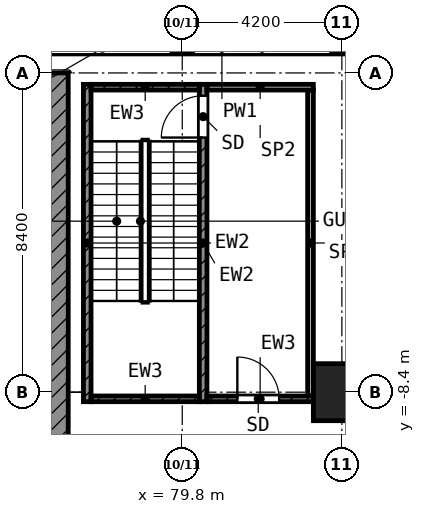
"""IFC4 building model, lengths in metres.
Left out: names, types, materials, properties, quantities, classifications, styles, units other than length and angle.
Written with IfcOpenShell. Run it as: python <this file> out.ifc"""

import sys

from ifc_helpers import new_model, si_unit, direction, frame, frame_2d, origin, origin_2d, place, context, subcontext, project, spatial, polyline, rectangle, outline, extrude, element, fill, save


model = new_model("IFC4")
c1 = context("Model", 3, precision=1e-05, world=origin(), true_north=direction((0.0, 1.0)))
c2 = subcontext(c1, "Body", "Model", "MODEL_VIEW")
j1 = project(units=[si_unit("LENGTHUNIT", "METRE"), si_unit("PLANEANGLEUNIT", "RADIAN")], contexts=[c1])
p1 = place(None, origin())
s1 = spatial("IfcSite", under=j1, at=p1, CompositionType="ELEMENT")
p2 = place(p1, origin())
s2 = spatial("IfcBuilding", under=s1, at=p2, CompositionType="ELEMENT")
p3 = place(p2, frame((0.0, 0.0, 7.0)))
s3 = spatial("IfcBuildingStorey", under=s2, at=p3, CompositionType="ELEMENT", Elevation=7.0)
p4 = place(p3, frame((84.0, -8.4, 0.0), z_axis=(0.0, 0.0, 1.0), x_axis=(1.0, 0.0, 0.0)))
e1 = element("IfcColumn", 1, at=p4, inside=s3, PredefinedType="COLUMN", context=c2, shape_type="SweptSolid", body=[
    extrude(rectangle(XDim=1.5, YDim=1.5, at=origin_2d()), origin(), (0.0, 0.0, 1.0), 5.6),
])
p5 = place(p3, frame((0.0, 0.0, -7.0), z_axis=(0.0, -1.0, 0.0), x_axis=(1.0, 0.0, 0.0)))
e2 = element("IfcWall", 2, at=p5, inside=s3, PredefinedType="SHEAR", context=c2, shape_type="SweptSolid", body=[
    extrude(outline(polyline([(74.4, 7.0), (74.4, 9.0), (74.241, 11.256), (73.952, 12.6), (76.8, 12.6), (76.8, 7.0), (74.4, 7.0)])), origin(), (0.0, 0.0, 1.0), 33.6),
])
p6 = place(p3, frame((87.138, 0.65, 0.0), z_axis=(0.0, 0.0, 1.0), x_axis=(-1.0, 0.0, 0.0)))
e3 = element("IfcWall", 3, at=p6, inside=s3, PredefinedType="SOLIDWALL", context=c2, shape_type="SweptSolid", body=[
    extrude(rectangle(XDim=12.588, YDim=0.3, at=frame_2d((6.294, 0.0))), origin(), (0.0, 0.0, 1.0), 5.25),
])
p7 = place(p6, frame((1.61, 0.0, 0.9)))
e4 = element("IfcOpeningElement", 4, at=p7, cuts=e3, PredefinedType="OPENING", context=c2, shape_type="SweptSolid", body=[
    extrude(rectangle(XDim=1.2, YDim=3.0, at=frame_2d((0.6, 1.5))), frame((0.0, 0.16, 0.0), z_axis=(0.0, -1.0, 0.0), x_axis=(1.0, 0.0, 0.0)), (0.0, 0.0, 1.0), 0.32),
])
p8 = place(p6, frame((3.438, 0.0, 0.9)))
e5 = element("IfcOpeningElement", 5, at=p8, cuts=e3, PredefinedType="OPENING", context=c2, shape_type="SweptSolid", body=[
    extrude(rectangle(XDim=3.6, YDim=3.0, at=frame_2d((1.8, 1.5))), frame((0.0, 0.16, 0.0), z_axis=(0.0, -1.0, 0.0), x_axis=(1.0, 0.0, 0.0)), (0.0, 0.0, 1.0), 0.32),
])
p9 = place(p6, frame((7.638, 0.0, 0.9)))
e6 = element("IfcOpeningElement", 6, at=p9, cuts=e3, PredefinedType="OPENING", context=c2, shape_type="SweptSolid", body=[
    extrude(rectangle(XDim=3.6, YDim=3.0, at=frame_2d((1.8, 1.5))), frame((0.0, 0.16, 0.0), z_axis=(0.0, -1.0, 0.0), x_axis=(1.0, 0.0, 0.0)), (0.0, 0.0, 1.0), 0.32),
])
p10 = place(p3, frame((77.3, -8.65, 0.0), z_axis=(0.0, 0.0, 1.0), x_axis=(0.0, 1.0, 0.0)))
e7 = element("IfcWall", 7, at=p10, inside=s3, PredefinedType="SHEAR", context=c2, shape_type="SweptSolid", body=[
    extrude(rectangle(XDim=8.35, YDim=0.2, at=frame_2d((4.175, 0.0))), origin(), (0.0, 0.0, 1.0), 5.25),
])
p11 = place(p3, frame((80.35, -8.65, 0.0), z_axis=(0.0, 0.0, 1.0), x_axis=(0.0, 1.0, 0.0)))
e8 = element("IfcWall", 8, at=p11, inside=s3, PredefinedType="SHEAR", context=c2, shape_type="SweptSolid", body=[
    extrude(rectangle(XDim=8.35, YDim=0.2, at=frame_2d((4.175, 0.0))), origin(), (0.0, 0.0, 1.0), 5.25),
])
p12 = place(p11, frame((6.95, 0.0, 0.0)))
e9 = element("IfcOpeningElement", 9, at=p12, cuts=e8, PredefinedType="OPENING", context=c2, shape_type="SweptSolid", body=[
    extrude(rectangle(XDim=1.1, YDim=2.1, at=frame_2d((0.55, 1.05))), frame((0.0, 0.11, 0.0), z_axis=(0.0, -1.0, 0.0), x_axis=(1.0, 0.0, 0.0)), (0.0, 0.0, 1.0), 0.22),
])
p13 = place(p3, frame((77.4, -0.375, 0.0), z_axis=(0.0, 0.0, 1.0), x_axis=(1.0, 0.0, 0.0)))
e10 = element("IfcWall", 10, at=p13, inside=s3, PredefinedType="SHEAR", context=c2, shape_type="SweptSolid", body=[
    extrude(rectangle(XDim=2.85, YDim=0.15, at=frame_2d((1.425, 0.0))), origin(), (0.0, 0.0, 1.0), 5.25),
])
p14 = place(p3, frame((80.45, -0.375, 0.0), z_axis=(0.0, 0.0, 1.0), x_axis=(1.0, 0.0, 0.0)))
e11 = element("IfcWall", 11, at=p14, inside=s3, PredefinedType="PARTITIONING", context=c2, shape_type="SweptSolid", body=[
    extrude(rectangle(XDim=2.8, YDim=0.15, at=frame_2d((1.4, 0.0))), origin(), (0.0, 0.0, 1.0), 5.25),
])
p15 = place(p3, frame((77.4, -8.575, 0.0), z_axis=(0.0, 0.0, 1.0), x_axis=(1.0, 0.0, 0.0)))
e12 = element("IfcWall", 12, at=p15, inside=s3, PredefinedType="SHEAR", context=c2, shape_type="SweptSolid", body=[
    extrude(rectangle(XDim=2.85, YDim=0.15, at=frame_2d((1.425, 0.0))), origin(), (0.0, 0.0, 1.0), 5.25),
])
p16 = place(p3, frame((80.45, -8.575, 0.0), z_axis=(0.0, 0.0, 1.0), x_axis=(1.0, 0.0, 0.0)))
e13 = element("IfcWall", 13, at=p16, inside=s3, PredefinedType="SHEAR", context=c2, shape_type="SweptSolid", body=[
    extrude(rectangle(XDim=2.8, YDim=0.15, at=frame_2d((1.4, 0.0))), origin(), (0.0, 0.0, 1.0), 5.25),
])
p17 = place(p16, frame((0.8, 0.0, 0.0)))
e14 = element("IfcOpeningElement", 14, at=p17, cuts=e13, PredefinedType="OPENING", context=c2, shape_type="SweptSolid", body=[
    extrude(rectangle(XDim=1.1, YDim=2.1, at=frame_2d((0.55, 1.05))), frame((0.0, 0.085, 0.0), z_axis=(0.0, -1.0, 0.0), x_axis=(1.0, 0.0, 0.0)), (0.0, 0.0, 1.0), 0.17),
])
p18 = place(p3, frame((83.175, -8.5, 0.0), z_axis=(0.0, 0.0, 1.0), x_axis=(0.0, 1.0, 0.0)))
e15 = element("IfcWall", 15, at=p18, inside=s3, PredefinedType="PARTITIONING", context=c2, shape_type="SweptSolid", body=[
    extrude(rectangle(XDim=8.05, YDim=0.15, at=frame_2d((4.025, 0.0))), origin(), (0.0, 0.0, 1.0), 5.25),
])
p19 = place(p3, frame((83.25, -8.4, 0.0), z_axis=(0.0, 0.0, 1.0), x_axis=(1.0, 0.0, 0.0)))
e16 = element("IfcWall", 16, at=p19, inside=s3, PredefinedType="PARTITIONING", context=c2, shape_type="SweptSolid", body=[
    extrude(rectangle(XDim=9.63, YDim=0.15, at=frame_2d((4.815, 0.0))), origin(), (0.0, 0.0, 1.0), 3.85),
])
p20 = place(p19, frame((2.567, 0.0, 0.0)))
e17 = element("IfcOpeningElement", 17, at=p20, cuts=e16, PredefinedType="OPENING", context=c2, shape_type="SweptSolid", body=[
    extrude(rectangle(XDim=1.5, YDim=2.1, at=frame_2d((0.75, 1.05))), frame((0.0, 0.085, 0.0), z_axis=(0.0, -1.0, 0.0), x_axis=(1.0, 0.0, 0.0)), (0.0, 0.0, 1.0), 0.17),
])
p21 = place(p19, frame((5.883, 0.0, 0.0)))
e18 = element("IfcOpeningElement", 18, at=p21, cuts=e16, PredefinedType="OPENING", context=c2, shape_type="SweptSolid", body=[
    extrude(rectangle(XDim=1.5, YDim=2.1, at=frame_2d((0.75, 1.05))), frame((0.0, 0.085, 0.0), z_axis=(0.0, -1.0, 0.0), x_axis=(1.0, 0.0, 0.0)), (0.0, 0.0, 1.0), 0.17),
])
p22 = place(p12, origin())
e19 = element("IfcDoor", 19, at=p22, inside=s3, OperationType="SINGLE_SWING_LEFT", PredefinedType="DOOR", context=c2, shape_type="SweptSolid", body=[
    extrude(rectangle(XDim=1.1, YDim=2.1, at=frame_2d((0.55, 1.05))), frame((0.0, 0.025, 0.0), z_axis=(0.0, -1.0, 0.0), x_axis=(1.0, 0.0, 0.0)), (0.0, 0.0, 1.0), 0.05),
])
fill(e9, e19)
p23 = place(p17, origin())
e20 = element("IfcDoor", 20, at=p23, inside=s3, OperationType="SINGLE_SWING_LEFT", PredefinedType="DOOR", context=c2, shape_type="SweptSolid", body=[
    extrude(rectangle(XDim=1.1, YDim=2.1, at=frame_2d((0.55, 1.05))), frame((0.0, 0.025, 0.0), z_axis=(0.0, -1.0, 0.0), x_axis=(1.0, 0.0, 0.0)), (0.0, 0.0, 1.0), 0.05),
])
fill(e14, e20)
save(model, sys.argv[1])
